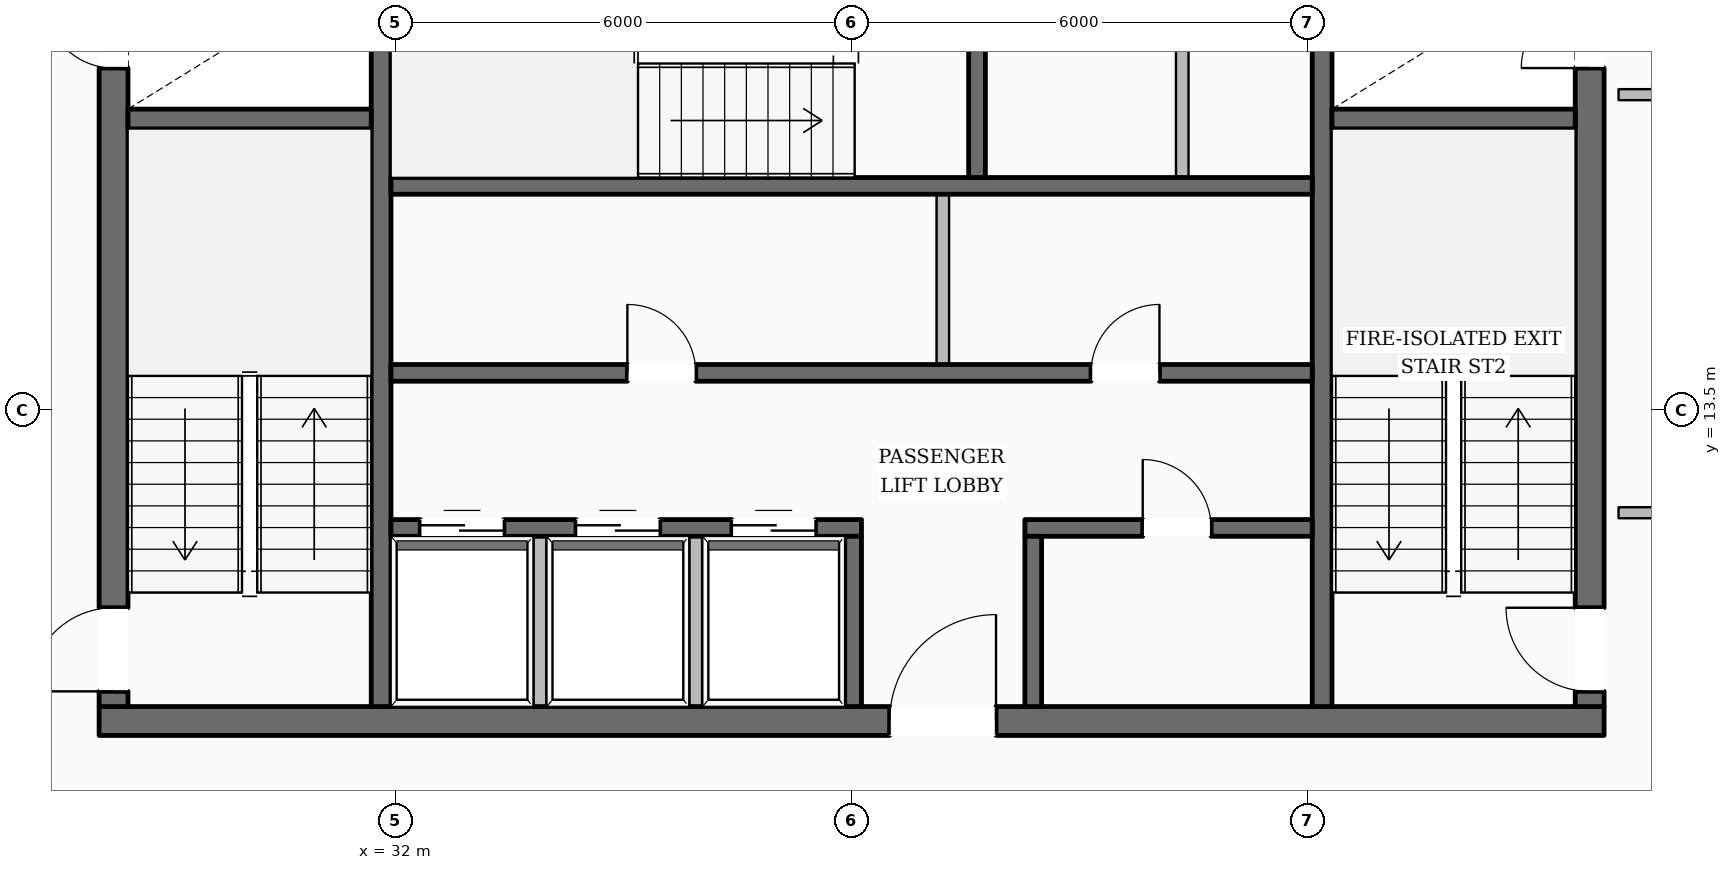
"""IFC4 building model, lengths in metres.
Left out: names, types, materials, properties, quantities, classifications, styles, units other than length and angle.
Written with IfcOpenShell. Run it as: python <this file> out.ifc"""

import sys

from ifc_helpers import new_model, si_unit, direction, frame, frame_2d, origin, place, context, subcontext, project, spatial, rectangle, extrude, element, fill, save


model = new_model("IFC4")
c1 = context("Model", 3, precision=1e-05, world=origin(), true_north=direction((0.0, 1.0)))
c2 = subcontext(c1, "Body", "Model", "MODEL_VIEW")
j1 = project(units=[si_unit("LENGTHUNIT", "METRE"), si_unit("PLANEANGLEUNIT", "RADIAN")], contexts=[c1])
p1 = place(None, origin())
s1 = spatial("IfcSite", under=j1, at=p1, CompositionType="ELEMENT")
p2 = place(p1, origin())
s2 = spatial("IfcBuilding", under=s1, at=p2, CompositionType="ELEMENT")
p3 = place(p2, frame((0.0, 0.0, 281.85)))
s3 = spatial("IfcBuildingStorey", under=s2, at=p3, CompositionType="ELEMENT", Elevation=281.85)
p4 = place(p3, frame((28.1, 9.41, 0.0), z_axis=(0.0, 0.0, 1.0), x_axis=(1.0, 0.0, 0.0)))
e1 = element("IfcWall", 1, at=p4, inside=s3, PredefinedType="SOLIDWALL", context=c2, shape_type="SweptSolid", body=[
    extrude(rectangle(XDim=19.8, YDim=0.38, at=frame_2d((9.9, 0.0))), origin(), (0.0, 0.0, 1.0), 3.61),
])
p5 = place(p4, frame((10.4, 0.0, 0.0)))
e2 = element("IfcOpeningElement", 2, at=p5, cuts=e1, PredefinedType="OPENING", context=c2, shape_type="SweptSolid", body=[
    extrude(rectangle(XDim=1.4, YDim=2.2, at=frame_2d((0.7, 1.1))), frame((0.0, 0.2, 0.0), z_axis=(0.0, -1.0, 0.0), x_axis=(1.0, 0.0, 0.0)), (0.0, 0.0, 1.0), 0.4),
])
p6 = place(p3, frame((28.29, 9.6, 0.0), z_axis=(0.0, 0.0, 1.0), x_axis=(0.0, 1.0, 0.0)))
e3 = element("IfcWall", 3, at=p6, inside=s3, PredefinedType="SOLIDWALL", context=c2, shape_type="SweptSolid", body=[
    extrude(rectangle(XDim=13.0, YDim=0.38, at=frame_2d((6.5, 0.0))), origin(), (0.0, 0.0, 1.0), 3.61),
])
p7 = place(p6, frame((0.2, 0.0, 0.0)))
e4 = element("IfcOpeningElement", 4, at=p7, cuts=e3, PredefinedType="OPENING", context=c2, shape_type="SweptSolid", body=[
    extrude(rectangle(XDim=1.1, YDim=2.15, at=frame_2d((0.55, 1.075))), frame((0.0, 0.2, 0.0), z_axis=(0.0, -1.0, 0.0), x_axis=(1.0, 0.0, 0.0)), (0.0, 0.0, 1.0), 0.4),
])
p8 = place(p6, frame((8.4, 0.0, 0.0)))
e5 = element("IfcOpeningElement", 5, at=p8, cuts=e3, PredefinedType="OPENING", context=c2, shape_type="SweptSolid", body=[
    extrude(rectangle(XDim=0.9, YDim=2.1, at=frame_2d((0.45, 1.05))), frame((0.0, 0.2, 0.0), z_axis=(0.0, -1.0, 0.0), x_axis=(1.0, 0.0, 0.0)), (0.0, 0.0, 1.0), 0.4),
])
p9 = place(p3, frame((47.71, 9.6, 0.0), z_axis=(0.0, 0.0, 1.0), x_axis=(0.0, 1.0, 0.0)))
e6 = element("IfcWall", 6, at=p9, inside=s3, PredefinedType="SOLIDWALL", context=c2, shape_type="SweptSolid", body=[
    extrude(rectangle(XDim=13.0, YDim=0.38, at=frame_2d((6.5, 0.0))), origin(), (0.0, 0.0, 1.0), 3.61),
])
p10 = place(p9, frame((0.2, 0.0, 0.0)))
e7 = element("IfcOpeningElement", 7, at=p10, cuts=e6, PredefinedType="OPENING", context=c2, shape_type="SweptSolid", body=[
    extrude(rectangle(XDim=1.1, YDim=2.15, at=frame_2d((0.55, 1.075))), frame((0.0, 0.2, 0.0), z_axis=(0.0, -1.0, 0.0), x_axis=(1.0, 0.0, 0.0)), (0.0, 0.0, 1.0), 0.4),
])
p11 = place(p9, frame((8.4, 0.0, 0.0)))
e8 = element("IfcOpeningElement", 8, at=p11, cuts=e6, PredefinedType="OPENING", context=c2, shape_type="SweptSolid", body=[
    extrude(rectangle(XDim=0.9, YDim=2.1, at=frame_2d((0.45, 1.05))), frame((0.0, 0.2, 0.0), z_axis=(0.0, -1.0, 0.0), x_axis=(1.0, 0.0, 0.0)), (0.0, 0.0, 1.0), 0.4),
])
p12 = place(p3, frame((31.81, 9.6, 0.0), z_axis=(0.0, 0.0, 1.0), x_axis=(0.0, 1.0, 0.0)))
e9 = element("IfcWall", 9, at=p12, inside=s3, PredefinedType="SHEAR", context=c2, shape_type="SweptSolid", body=[
    extrude(rectangle(XDim=13.0, YDim=0.26, at=frame_2d((6.5, 0.0))), origin(), (0.0, 0.0, 1.0), 3.61),
])
p13 = place(p12, frame((10.925, 0.0, 0.0)))
e10 = element("IfcOpeningElement", 10, at=p13, cuts=e9, PredefinedType="OPENING", context=c2, shape_type="SweptSolid", body=[
    extrude(rectangle(XDim=1.25, YDim=2.25, at=frame_2d((0.625, 1.125))), frame((0.0, 0.14, 0.0), z_axis=(0.0, -1.0, 0.0), x_axis=(1.0, 0.0, 0.0)), (0.0, 0.0, 1.0), 0.28),
])
p14 = place(p3, frame((44.19, 9.6, 0.0), z_axis=(0.0, 0.0, 1.0), x_axis=(0.0, 1.0, 0.0)))
e11 = element("IfcWall", 11, at=p14, inside=s3, PredefinedType="SHEAR", context=c2, shape_type="SweptSolid", body=[
    extrude(rectangle(XDim=13.0, YDim=0.26, at=frame_2d((6.5, 0.0))), origin(), (0.0, 0.0, 1.0), 3.61),
])
p15 = place(p14, frame((10.925, 0.0, 0.0)))
e12 = element("IfcOpeningElement", 12, at=p15, cuts=e11, PredefinedType="OPENING", context=c2, shape_type="SweptSolid", body=[
    extrude(rectangle(XDim=1.25, YDim=2.25, at=frame_2d((0.625, 1.125))), frame((0.0, 0.14, 0.0), z_axis=(0.0, -1.0, 0.0), x_axis=(1.0, 0.0, 0.0)), (0.0, 0.0, 1.0), 0.28),
])
for number, where, z_axis, x_axis in (
    (13, (28.48, 17.33, 0.0), (0.0, 0.0, 1.0), (1.0, 0.0, 0.0)),
    (14, (44.32, 17.33, 0.0), (0.0, 0.0, 1.0), (1.0, 0.0, 0.0)),
):
    element("IfcWall", number, at=place(p3, frame(where, z_axis=z_axis, x_axis=x_axis)), inside=s3, PredefinedType="SHEAR", context=c2, shape_type="SweptSolid", body=[
        extrude(rectangle(XDim=3.2, YDim=0.26, at=frame_2d((1.6, 0.0))), origin(), (0.0, 0.0, 1.0), 3.61),
    ])
p16 = place(p3, frame((31.94, 16.45, 0.0), z_axis=(0.0, 0.0, 1.0), x_axis=(1.0, 0.0, 0.0)))
e15 = element("IfcWall", 15, at=p16, inside=s3, PredefinedType="SOLIDWALL", context=c2, shape_type="SweptSolid", body=[
    extrude(rectangle(XDim=12.12, YDim=0.22, at=frame_2d((6.06, 0.0))), origin(), (0.0, 0.0, 1.0), 3.61),
])
p17 = place(p3, frame((39.65, 16.56, 0.0), z_axis=(0.0, 0.0, 1.0), x_axis=(0.0, 1.0, 0.0)))
e16 = element("IfcWall", 16, at=p17, inside=s3, PredefinedType="SOLIDWALL", context=c2, shape_type="SweptSolid", body=[
    extrude(rectangle(XDim=3.2, YDim=0.22, at=frame_2d((1.6, 0.0))), origin(), (0.0, 0.0, 1.0), 3.61),
])
p18 = place(p3, frame((31.94, 13.99, 0.0), z_axis=(0.0, 0.0, 1.0), x_axis=(1.0, 0.0, 0.0)))
e17 = element("IfcWall", 17, at=p18, inside=s3, PredefinedType="SOLIDWALL", context=c2, shape_type="SweptSolid", body=[
    extrude(rectangle(XDim=12.12, YDim=0.22, at=frame_2d((6.06, 0.0))), origin(), (0.0, 0.0, 1.0), 3.61),
])
p19 = place(p18, frame((3.11, 0.0, 0.0)))
e18 = element("IfcOpeningElement", 18, at=p19, cuts=e17, PredefinedType="OPENING", context=c2, shape_type="SweptSolid", body=[
    extrude(rectangle(XDim=0.9, YDim=2.1, at=frame_2d((0.45, 1.05))), frame((0.0, 0.12, 0.0), z_axis=(0.0, -1.0, 0.0), x_axis=(1.0, 0.0, 0.0)), (0.0, 0.0, 1.0), 0.24),
])
p20 = place(p18, frame((9.21, 0.0, 0.0)))
e19 = element("IfcOpeningElement", 19, at=p20, cuts=e17, PredefinedType="OPENING", context=c2, shape_type="SweptSolid", body=[
    extrude(rectangle(XDim=0.9, YDim=2.1, at=frame_2d((0.45, 1.05))), frame((0.0, 0.12, 0.0), z_axis=(0.0, -1.0, 0.0), x_axis=(1.0, 0.0, 0.0)), (0.0, 0.0, 1.0), 0.24),
])
p21 = place(p3, frame((31.94, 11.95, 0.0), z_axis=(0.0, 0.0, 1.0), x_axis=(1.0, 0.0, 0.0)))
e20 = element("IfcWall", 20, at=p21, inside=s3, PredefinedType="SOLIDWALL", context=c2, shape_type="SweptSolid", body=[
    extrude(rectangle(XDim=6.19, YDim=0.22, at=frame_2d((3.095, 0.0))), origin(), (0.0, 0.0, 1.0), 3.61),
])
p22 = place(p21, frame((0.385, 0.0, 0.0)))
e21 = element("IfcOpeningElement", 21, at=p22, cuts=e20, PredefinedType="OPENING", context=c2, shape_type="SweptSolid", body=[
    extrude(rectangle(XDim=1.1, YDim=2.2, at=frame_2d((0.55, 1.1))), frame((0.0, 0.12, 0.0), z_axis=(0.0, -1.0, 0.0), x_axis=(1.0, 0.0, 0.0)), (0.0, 0.0, 1.0), 0.24),
])
p23 = place(p21, frame((2.435, 0.0, 0.0)))
e22 = element("IfcOpeningElement", 22, at=p23, cuts=e20, PredefinedType="OPENING", context=c2, shape_type="SweptSolid", body=[
    extrude(rectangle(XDim=1.1, YDim=2.2, at=frame_2d((0.55, 1.1))), frame((0.0, 0.12, 0.0), z_axis=(0.0, -1.0, 0.0), x_axis=(1.0, 0.0, 0.0)), (0.0, 0.0, 1.0), 0.24),
])
p24 = place(p21, frame((4.485, 0.0, 0.0)))
e23 = element("IfcOpeningElement", 23, at=p24, cuts=e20, PredefinedType="OPENING", context=c2, shape_type="SweptSolid", body=[
    extrude(rectangle(XDim=1.1, YDim=2.2, at=frame_2d((0.55, 1.1))), frame((0.0, 0.12, 0.0), z_axis=(0.0, -1.0, 0.0), x_axis=(1.0, 0.0, 0.0)), (0.0, 0.0, 1.0), 0.24),
])
p25 = place(p3, frame((40.28, 11.95, 0.0), z_axis=(0.0, 0.0, 1.0), x_axis=(1.0, 0.0, 0.0)))
e24 = element("IfcWall", 24, at=p25, inside=s3, PredefinedType="SOLIDWALL", context=c2, shape_type="SweptSolid", body=[
    extrude(rectangle(XDim=3.78, YDim=0.22, at=frame_2d((1.89, 0.0))), origin(), (0.0, 0.0, 1.0), 3.61),
])
p26 = place(p25, frame((1.55, 0.0, 0.0)))
e25 = element("IfcOpeningElement", 25, at=p26, cuts=e24, PredefinedType="OPENING", context=c2, shape_type="SweptSolid", body=[
    extrude(rectangle(XDim=0.9, YDim=2.1, at=frame_2d((0.45, 1.05))), frame((0.0, 0.12, 0.0), z_axis=(0.0, -1.0, 0.0), x_axis=(1.0, 0.0, 0.0)), (0.0, 0.0, 1.0), 0.24),
])
for number, where, z_axis, x_axis in (
    (26, (38.02, 9.6, 0.0), (0.0, 0.0, 1.0), (0.0, 1.0, 0.0)),
    (27, (40.39, 9.6, 0.0), (0.0, 0.0, 1.0), (0.0, 1.0, 0.0)),
):
    element("IfcWall", number, at=place(p3, frame(where, z_axis=z_axis, x_axis=x_axis)), inside=s3, PredefinedType="SOLIDWALL", context=c2, shape_type="SweptSolid", body=[
        extrude(rectangle(XDim=2.24, YDim=0.22, at=frame_2d((1.12, 0.0))), origin(), (0.0, 0.0, 1.0), 3.61),
    ])
p27 = place(p3, frame((15.219, 10.076, 0.0), z_axis=(0.0, 0.0, 1.0), x_axis=(0.509799642177, 0.860293162147, 0.0)))
e28 = element("IfcWall", 28, at=p27, inside=s3, PredefinedType="STANDARD", context=c2, shape_type="SweptSolid", body=[
    extrude(rectangle(XDim=38.963, YDim=0.35, at=frame_2d((19.481, 0.0))), origin(), (0.0, 0.0, 1.0), 3.196),
])
p28 = place(p27, frame((34.65, 0.0, 0.65)))
e29 = element("IfcOpeningElement", 29, at=p28, cuts=e28, PredefinedType="OPENING", context=c2, shape_type="SweptSolid", body=[
    extrude(rectangle(XDim=1.35, YDim=1.75, at=frame_2d((0.675, 0.875))), frame((0.0, 0.185, 0.0), z_axis=(0.0, -1.0, 0.0), x_axis=(1.0, 0.0, 0.0)), (0.0, 0.0, 1.0), 0.37),
])
p29 = place(p27, frame((28.314, 0.0, 0.65)))
e30 = element("IfcOpeningElement", 30, at=p29, cuts=e28, PredefinedType="OPENING", context=c2, shape_type="SweptSolid", body=[
    extrude(rectangle(XDim=1.35, YDim=1.75, at=frame_2d((0.675, 0.875))), frame((0.0, 0.185, 0.0), z_axis=(0.0, -1.0, 0.0), x_axis=(1.0, 0.0, 0.0)), (0.0, 0.0, 1.0), 0.37),
])
p30 = place(p27, frame((15.645, 0.0, 0.65)))
e31 = element("IfcOpeningElement", 31, at=p30, cuts=e28, PredefinedType="OPENING", context=c2, shape_type="SweptSolid", body=[
    extrude(rectangle(XDim=1.35, YDim=1.75, at=frame_2d((0.675, 0.875))), frame((0.0, 0.185, 0.0), z_axis=(0.0, -1.0, 0.0), x_axis=(1.0, 0.0, 0.0)), (0.0, 0.0, 1.0), 0.37),
])
p31 = place(p27, frame((9.309, 0.0, 0.65)))
e32 = element("IfcOpeningElement", 32, at=p31, cuts=e28, PredefinedType="OPENING", context=c2, shape_type="SweptSolid", body=[
    extrude(rectangle(XDim=1.35, YDim=1.75, at=frame_2d((0.675, 0.875))), frame((0.0, 0.185, 0.0), z_axis=(0.0, -1.0, 0.0), x_axis=(1.0, 0.0, 0.0)), (0.0, 0.0, 1.0), 0.37),
])
p32 = place(p27, frame((2.974, 0.0, 0.65)))
e33 = element("IfcOpeningElement", 33, at=p32, cuts=e28, PredefinedType="OPENING", context=c2, shape_type="SweptSolid", body=[
    extrude(rectangle(XDim=1.35, YDim=1.75, at=frame_2d((0.675, 0.875))), frame((0.0, 0.185, 0.0), z_axis=(0.0, -1.0, 0.0), x_axis=(1.0, 0.0, 0.0)), (0.0, 0.0, 1.0), 0.37),
])
p33 = place(p3, frame((40.827, 43.65, 0.0), z_axis=(0.0, 0.0, 1.0), x_axis=(0.502670175865, -0.864478278672, 0.0)))
e34 = element("IfcWall", 34, at=p33, inside=s3, PredefinedType="STANDARD", context=c2, shape_type="SweptSolid", body=[
    extrude(rectangle(XDim=38.406, YDim=0.35, at=frame_2d((19.203, 0.0))), origin(), (0.0, 0.0, 1.0), 3.196),
])
p34 = place(p33, frame((34.128, 0.0, 0.65)))
e35 = element("IfcOpeningElement", 35, at=p34, cuts=e34, PredefinedType="OPENING", context=c2, shape_type="SweptSolid", body=[
    extrude(rectangle(XDim=1.35, YDim=1.75, at=frame_2d((0.675, 0.875))), frame((0.0, 0.185, 0.0), z_axis=(0.0, -1.0, 0.0), x_axis=(1.0, 0.0, 0.0)), (0.0, 0.0, 1.0), 0.37),
])
p35 = place(p33, frame((27.888, 0.0, 0.65)))
e36 = element("IfcOpeningElement", 36, at=p35, cuts=e34, PredefinedType="OPENING", context=c2, shape_type="SweptSolid", body=[
    extrude(rectangle(XDim=1.35, YDim=1.75, at=frame_2d((0.675, 0.875))), frame((0.0, 0.185, 0.0), z_axis=(0.0, -1.0, 0.0), x_axis=(1.0, 0.0, 0.0)), (0.0, 0.0, 1.0), 0.37),
])
p36 = place(p33, frame((15.406, 0.0, 0.65)))
e37 = element("IfcOpeningElement", 37, at=p36, cuts=e34, PredefinedType="OPENING", context=c2, shape_type="SweptSolid", body=[
    extrude(rectangle(XDim=1.35, YDim=1.75, at=frame_2d((0.675, 0.875))), frame((0.0, 0.185, 0.0), z_axis=(0.0, -1.0, 0.0), x_axis=(1.0, 0.0, 0.0)), (0.0, 0.0, 1.0), 0.37),
])
p37 = place(p33, frame((9.165, 0.0, 0.65)))
e38 = element("IfcOpeningElement", 38, at=p37, cuts=e34, PredefinedType="OPENING", context=c2, shape_type="SweptSolid", body=[
    extrude(rectangle(XDim=1.35, YDim=1.75, at=frame_2d((0.675, 0.875))), frame((0.0, 0.185, 0.0), z_axis=(0.0, -1.0, 0.0), x_axis=(1.0, 0.0, 0.0)), (0.0, 0.0, 1.0), 0.37),
])
p38 = place(p33, frame((2.924, 0.0, 0.65)))
e39 = element("IfcOpeningElement", 39, at=p38, cuts=e34, PredefinedType="OPENING", context=c2, shape_type="SweptSolid", body=[
    extrude(rectangle(XDim=1.35, YDim=1.75, at=frame_2d((0.675, 0.875))), frame((0.0, 0.185, 0.0), z_axis=(0.0, -1.0, 0.0), x_axis=(1.0, 0.0, 0.0)), (0.0, 0.0, 1.0), 0.37),
])
for number, where, z_axis, x_axis in (
    (40, (33.9, 9.49, 0.0), (0.0, 0.0, 1.0), (0.0, 1.0, 0.0)),
    (41, (35.95, 9.49, 0.0), (0.0, 0.0, 1.0), (0.0, 1.0, 0.0)),
):
    element("IfcWall", number, at=place(p3, frame(where, z_axis=z_axis, x_axis=x_axis)), inside=s3, PredefinedType="PARTITIONING", context=c2, shape_type="SweptSolid", body=[
        extrude(rectangle(XDim=2.35, YDim=0.165, at=frame_2d((1.175, 0.0))), origin(), (0.0, 0.0, 1.0), 3.61),
    ])
p39 = place(p3, frame((39.2, 14.1, 0.0), z_axis=(0.0, 0.0, 1.0), x_axis=(0.0, 1.0, 0.0)))
e42 = element("IfcWall", 42, at=p39, inside=s3, PredefinedType="PARTITIONING", context=c2, shape_type="SweptSolid", body=[
    extrude(rectangle(XDim=2.24, YDim=0.165, at=frame_2d((1.12, 0.0))), origin(), (0.0, 0.0, 1.0), 3.61),
])
p40 = place(p3, frame((42.35, 16.56, 0.0), z_axis=(0.0, 0.0, 1.0), x_axis=(0.0, 1.0, 0.0)))
e43 = element("IfcWall", 43, at=p40, inside=s3, PredefinedType="PARTITIONING", context=c2, shape_type="SweptSolid", body=[
    extrude(rectangle(XDim=3.2, YDim=0.165, at=frame_2d((1.6, 0.0))), origin(), (0.0, 0.0, 1.0), 3.61),
])
for number, where, z_axis, x_axis in (
    (44, (49.91, 17.65, 0.0), (0.0, 0.0, 1.0), (-1.0, 0.0, 0.0)),
    (45, (48.09, 12.15, 0.0), (0.0, 0.0, 1.0), (1.0, 0.0, 0.0)),
):
    element("IfcWall", number, at=place(p3, frame(where, z_axis=z_axis, x_axis=x_axis)), inside=s3, PredefinedType="PARTITIONING", context=c2, shape_type="SweptSolid", body=[
        extrude(rectangle(XDim=1.82, YDim=0.145, at=frame_2d((0.91, 0.0))), origin(), (0.0, 0.0, 1.0), 3.61),
    ])
p41 = place(p7, origin())
e46 = element("IfcDoor", 46, at=p41, inside=s3, OperationType="SINGLE_SWING_LEFT", PredefinedType="DOOR", context=c2, shape_type="SweptSolid", body=[
    extrude(rectangle(XDim=1.1, YDim=2.15, at=frame_2d((0.55, 1.075))), frame((0.0, 0.025, 0.0), z_axis=(0.0, -1.0, 0.0), x_axis=(1.0, 0.0, 0.0)), (0.0, 0.0, 1.0), 0.05),
])
fill(e4, e46)
p42 = place(p10, origin())
e47 = element("IfcDoor", 47, at=p42, inside=s3, OperationType="SINGLE_SWING_RIGHT", PredefinedType="DOOR", context=c2, shape_type="SweptSolid", body=[
    extrude(rectangle(XDim=1.1, YDim=2.15, at=frame_2d((0.55, 1.075))), frame((0.0, 0.025, 0.0), z_axis=(0.0, -1.0, 0.0), x_axis=(1.0, 0.0, 0.0)), (0.0, 0.0, 1.0), 0.05),
])
fill(e7, e47)
p43 = place(p8, origin())
e48 = element("IfcDoor", 48, at=p43, inside=s3, OperationType="SINGLE_SWING_RIGHT", PredefinedType="DOOR", context=c2, shape_type="SweptSolid", body=[
    extrude(rectangle(XDim=0.9, YDim=2.1, at=frame_2d((0.45, 1.05))), frame((0.0, 0.025, 0.0), z_axis=(0.0, -1.0, 0.0), x_axis=(1.0, 0.0, 0.0)), (0.0, 0.0, 1.0), 0.05),
])
fill(e5, e48)
p44 = place(p11, origin())
e49 = element("IfcDoor", 49, at=p44, inside=s3, OperationType="SINGLE_SWING_LEFT", PredefinedType="DOOR", context=c2, shape_type="SweptSolid", body=[
    extrude(rectangle(XDim=0.9, YDim=2.1, at=frame_2d((0.45, 1.05))), frame((0.0, 0.025, 0.0), z_axis=(0.0, -1.0, 0.0), x_axis=(1.0, 0.0, 0.0)), (0.0, 0.0, 1.0), 0.05),
])
fill(e8, e49)
p45 = place(p5, origin())
e50 = element("IfcDoor", 50, at=p45, inside=s3, OperationType="SINGLE_SWING_RIGHT", PredefinedType="DOOR", context=c2, shape_type="SweptSolid", body=[
    extrude(rectangle(XDim=1.4, YDim=2.2, at=frame_2d((0.7, 1.1))), frame((0.0, 0.025, 0.0), z_axis=(0.0, -1.0, 0.0), x_axis=(1.0, 0.0, 0.0)), (0.0, 0.0, 1.0), 0.05),
])
fill(e2, e50)
p46 = place(p22, origin())
e51 = element("IfcDoor", 51, at=p46, inside=s3, OperationType="DOUBLE_DOOR_SLIDING", PredefinedType="DOOR", context=c2, shape_type="SweptSolid", body=[
    extrude(rectangle(XDim=1.1, YDim=2.2, at=frame_2d((0.55, 1.1))), frame((0.0, 0.025, 0.0), z_axis=(0.0, -1.0, 0.0), x_axis=(1.0, 0.0, 0.0)), (0.0, 0.0, 1.0), 0.05),
])
fill(e21, e51)
p47 = place(p23, origin())
e52 = element("IfcDoor", 52, at=p47, inside=s3, OperationType="DOUBLE_DOOR_SLIDING", PredefinedType="DOOR", context=c2, shape_type="SweptSolid", body=[
    extrude(rectangle(XDim=1.1, YDim=2.2, at=frame_2d((0.55, 1.1))), frame((0.0, 0.025, 0.0), z_axis=(0.0, -1.0, 0.0), x_axis=(1.0, 0.0, 0.0)), (0.0, 0.0, 1.0), 0.05),
])
fill(e22, e52)
p48 = place(p24, origin())
e53 = element("IfcDoor", 53, at=p48, inside=s3, OperationType="DOUBLE_DOOR_SLIDING", PredefinedType="DOOR", context=c2, shape_type="SweptSolid", body=[
    extrude(rectangle(XDim=1.1, YDim=2.2, at=frame_2d((0.55, 1.1))), frame((0.0, 0.025, 0.0), z_axis=(0.0, -1.0, 0.0), x_axis=(1.0, 0.0, 0.0)), (0.0, 0.0, 1.0), 0.05),
])
fill(e23, e53)
p49 = place(p19, origin())
e54 = element("IfcDoor", 54, at=p49, inside=s3, OperationType="SINGLE_SWING_LEFT", PredefinedType="DOOR", context=c2, shape_type="SweptSolid", body=[
    extrude(rectangle(XDim=0.9, YDim=2.1, at=frame_2d((0.45, 1.05))), frame((0.0, 0.025, 0.0), z_axis=(0.0, -1.0, 0.0), x_axis=(1.0, 0.0, 0.0)), (0.0, 0.0, 1.0), 0.05),
])
fill(e18, e54)
p50 = place(p20, origin())
e55 = element("IfcDoor", 55, at=p50, inside=s3, OperationType="SINGLE_SWING_RIGHT", PredefinedType="DOOR", context=c2, shape_type="SweptSolid", body=[
    extrude(rectangle(XDim=0.9, YDim=2.1, at=frame_2d((0.45, 1.05))), frame((0.0, 0.025, 0.0), z_axis=(0.0, -1.0, 0.0), x_axis=(1.0, 0.0, 0.0)), (0.0, 0.0, 1.0), 0.05),
])
fill(e19, e55)
p51 = place(p26, origin())
e56 = element("IfcDoor", 56, at=p51, inside=s3, OperationType="SINGLE_SWING_LEFT", PredefinedType="DOOR", context=c2, shape_type="SweptSolid", body=[
    extrude(rectangle(XDim=0.9, YDim=2.1, at=frame_2d((0.45, 1.05))), frame((0.0, 0.025, 0.0), z_axis=(0.0, -1.0, 0.0), x_axis=(1.0, 0.0, 0.0)), (0.0, 0.0, 1.0), 0.05),
])
fill(e25, e56)
save(model, sys.argv[1])
